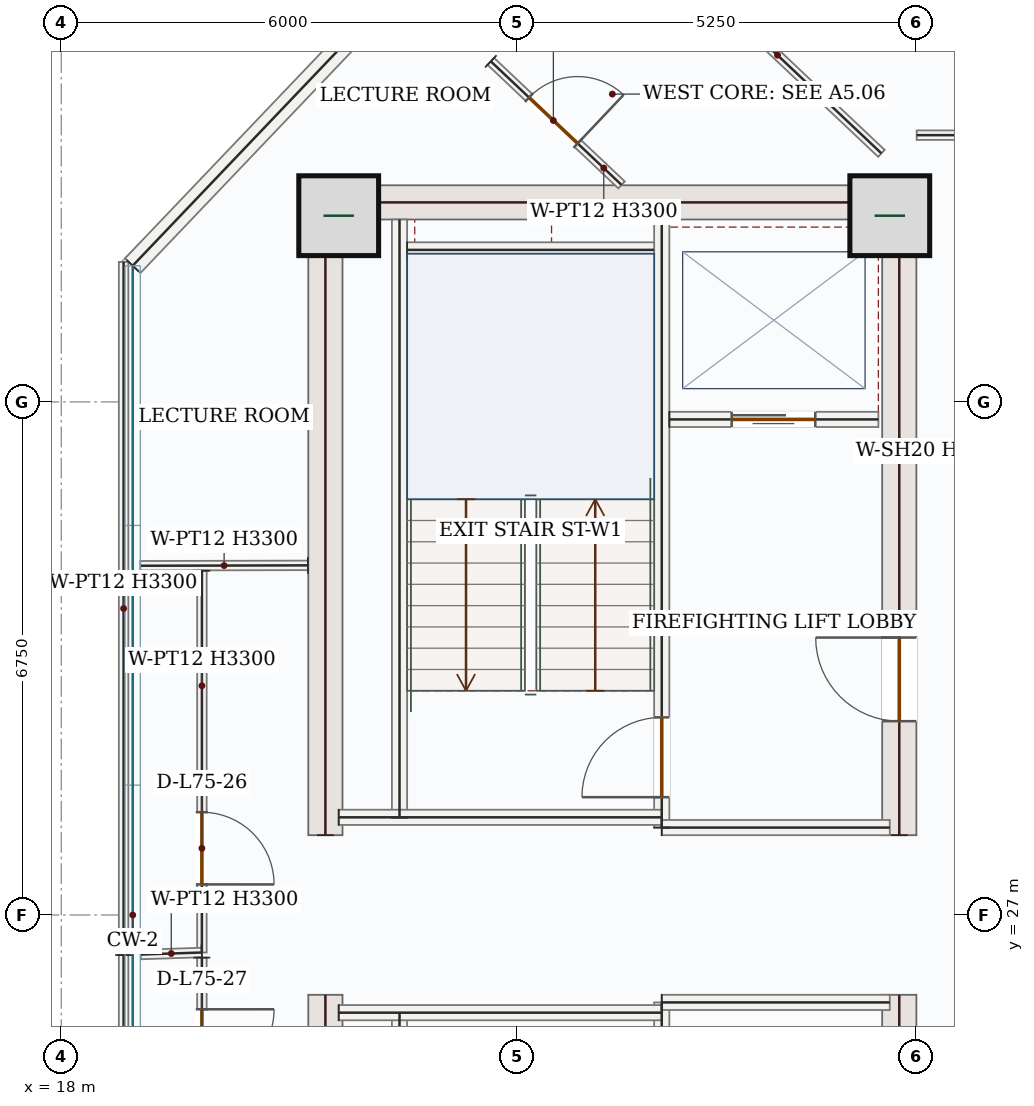
"""IFC4 building model, lengths in metres.
Left out: names, types, materials, properties, quantities, classifications, styles, units other than length and angle.
Written with IfcOpenShell. Run it as: python <this file> out.ifc"""

import sys

from ifc_helpers import new_model, si_unit, direction, frame, frame_2d, origin, origin_2d, place, context, subcontext, project, spatial, rectangle, extrude, source, transform, mapped, element, fill, save


model = new_model("IFC4")
c1 = context("Model", 3, precision=1e-05, world=origin(), true_north=direction((0.0, 1.0)))
c2 = subcontext(c1, "Body", "Model", "MODEL_VIEW")
j1 = project(units=[si_unit("LENGTHUNIT", "METRE"), si_unit("PLANEANGLEUNIT", "RADIAN")], contexts=[c1])
p1 = place(None, origin())
s1 = spatial("IfcSite", under=j1, at=p1, CompositionType="ELEMENT")
p2 = place(p1, origin())
s2 = spatial("IfcBuilding", under=s1, at=p2, CompositionType="ELEMENT")
p3 = place(p2, frame((0.0, 0.0, 310.35)))
s3 = spatial("IfcBuildingStorey", under=s2, at=p3, CompositionType="ELEMENT", Elevation=310.35)
m1 = source(origin(), c2, "Body", "SweptSolid", [
    extrude(rectangle(XDim=8.55, YDim=0.45, at=frame_2d((4.275, 0.0))), origin(), (0.0, 0.0, 1.0), 3.3),
])
for number, where, z_axis, x_axis in (
    (1, (21.475, 17.4, 0.0), (0.0, 0.0, 1.0), (0.0, 1.0, 0.0)),
    (2, (21.475, 28.05, 0.0), (0.0, 0.0, 1.0), (0.0, 1.0, 0.0)),
):
    element("IfcWall", number, at=place(p3, frame(where, z_axis=z_axis, x_axis=x_axis)), inside=s3, PredefinedType="SHEAR", context=c2, shape_type="MappedRepresentation", body=[
        mapped(m1, transform((0.0, 0.0, 0.0), x_axis=(1.0, 0.0, 0.0), y_axis=(0.0, 1.0, 0.0), z_axis=(0.0, 0.0, 1.0), scale=1.0)),
    ])
p4 = place(p3, frame((29.025, 17.4, 0.0), z_axis=(0.0, 0.0, 1.0), x_axis=(0.0, 1.0, 0.0)))
e3 = element("IfcWall", 3, at=p4, inside=s3, PredefinedType="SHEAR", context=c2, shape_type="SweptSolid", body=[
    extrude(rectangle(XDim=8.55, YDim=0.45, at=frame_2d((4.275, 0.0))), origin(), (0.0, 0.0, 1.0), 3.3),
])
p5 = place(p4, frame((6.65, 0.0, 0.0)))
e4 = element("IfcOpeningElement", 4, at=p5, cuts=e3, PredefinedType="OPENING", context=c2, shape_type="SweptSolid", body=[
    extrude(rectangle(XDim=1.1, YDim=2.2, at=frame_2d((0.55, 1.1))), frame((0.0, 0.235, 0.0), z_axis=(0.0, -1.0, 0.0), x_axis=(1.0, 0.0, 0.0)), (0.0, 0.0, 1.0), 0.47),
])
p6 = place(p4, frame((2.7, 0.0, 0.0)))
e5 = element("IfcOpeningElement", 5, at=p6, cuts=e3, PredefinedType="OPENING", context=c2, shape_type="SweptSolid", body=[
    extrude(rectangle(XDim=0.88, YDim=2.1, at=frame_2d((0.44, 1.05))), frame((0.0, 0.235, 0.0), z_axis=(0.0, -1.0, 0.0), x_axis=(1.0, 0.0, 0.0)), (0.0, 0.0, 1.0), 0.47),
])
p7 = place(p4, frame((4.6, 0.0, 0.0)))
e6 = element("IfcOpeningElement", 6, at=p7, cuts=e3, PredefinedType="OPENING", context=c2, shape_type="SweptSolid", body=[
    extrude(rectangle(XDim=0.88, YDim=2.1, at=frame_2d((0.44, 1.05))), frame((0.0, 0.235, 0.0), z_axis=(0.0, -1.0, 0.0), x_axis=(1.0, 0.0, 0.0)), (0.0, 0.0, 1.0), 0.47),
])
p8 = place(p3, frame((29.025, 28.05, 0.0), z_axis=(0.0, 0.0, 1.0), x_axis=(0.0, 1.0, 0.0)))
e7 = element("IfcWall", 7, at=p8, inside=s3, PredefinedType="SHEAR", context=c2, shape_type="SweptSolid", body=[
    extrude(rectangle(XDim=8.55, YDim=0.45, at=frame_2d((4.275, 0.0))), origin(), (0.0, 0.0, 1.0), 3.3),
])
p9 = place(p8, frame((1.5, 0.0, 0.0)))
e8 = element("IfcOpeningElement", 8, at=p9, cuts=e7, PredefinedType="OPENING", context=c2, shape_type="SweptSolid", body=[
    extrude(rectangle(XDim=1.1, YDim=2.2, at=frame_2d((0.55, 1.1))), frame((0.0, 0.235, 0.0), z_axis=(0.0, -1.0, 0.0), x_axis=(1.0, 0.0, 0.0)), (0.0, 0.0, 1.0), 0.47),
])
m2 = source(origin(), c2, "Body", "SweptSolid", [
    extrude(rectangle(XDim=7.1, YDim=0.45, at=frame_2d((3.55, 0.0))), origin(), (0.0, 0.0, 1.0), 3.3),
])
p10 = place(p3, frame((21.7, 36.375, 0.0), z_axis=(0.0, 0.0, 1.0), x_axis=(1.0, 0.0, 0.0)))
e9 = element("IfcWall", 9, at=p10, inside=s3, PredefinedType="SHEAR", context=c2, shape_type="MappedRepresentation", body=[
    mapped(m2, transform((0.0, 0.0, 0.0), x_axis=(1.0, 0.0, 0.0), y_axis=(0.0, 1.0, 0.0), z_axis=(0.0, 0.0, 1.0), scale=1.0)),
])
m3 = source(origin(), c2, "Body", "SweptSolid", [
    extrude(rectangle(XDim=1.05, YDim=1.05, at=origin_2d()), origin(), (0.0, 0.0, 1.0), 3.75),
])
for number, where, z_axis, x_axis in (
    (10, (21.65, 36.2, 0.0), (0.0, 0.0, 1.0), (1.0, 0.0, 0.0)),
    (11, (28.9, 36.2, 0.0), (0.0, 0.0, 1.0), (1.0, 0.0, 0.0)),
):
    element("IfcColumn", number, at=place(p3, frame(where, z_axis=z_axis, x_axis=x_axis)), inside=s3, PredefinedType="COLUMN", context=c2, shape_type="MappedRepresentation", body=[
        mapped(m3, transform((0.0, 0.0, 0.0), x_axis=(1.0, 0.0, 0.0), y_axis=(0.0, 1.0, 0.0), z_axis=(0.0, 0.0, 1.0), scale=1.0)),
    ])
m4 = source(origin(), c2, "Body", "SweptSolid", [
    extrude(rectangle(XDim=10.47, YDim=0.28, at=frame_2d((5.235, 0.0))), origin(), (0.0, 0.0, 1.0), 3.3),
])
p11 = place(p3, frame((18.94, 35.542, 0.0), z_axis=(0.0, 0.0, 1.0), x_axis=(0.690070788875, 0.723741878256, 0.0)))
e12 = element("IfcWall", 12, at=p11, inside=s3, PredefinedType="SOLIDWALL", context=c2, shape_type="MappedRepresentation", body=[
    mapped(m4, transform((0.0, 0.0, 0.0), x_axis=(1.0, 0.0, 0.0), y_axis=(0.0, 1.0, 0.0), z_axis=(0.0, 0.0, 1.0), scale=1.0)),
])
m5 = source(origin(), c2, "Body", "SweptSolid", [
    extrude(rectangle(XDim=7.87, YDim=0.2, at=frame_2d((3.935, 0.0))), origin(), (0.0, 0.0, 1.0), 3.3),
])
for number, where, z_axis, x_axis in (
    (13, (22.45, 17.85, 0.0), (0.0, 0.0, 1.0), (0.0, 1.0, 0.0)),
    (14, (22.45, 28.28, 0.0), (0.0, 0.0, 1.0), (0.0, 1.0, 0.0)),
):
    element("IfcWall", number, at=place(p3, frame(where, z_axis=z_axis, x_axis=x_axis)), inside=s3, PredefinedType="SOLIDWALL", context=c2, shape_type="MappedRepresentation", body=[
        mapped(m5, transform((0.0, 0.0, 0.0), x_axis=(1.0, 0.0, 0.0), y_axis=(0.0, 1.0, 0.0), z_axis=(0.0, 0.0, 1.0), scale=1.0)),
    ])
p12 = place(p3, frame((25.9, 17.85, 0.0), z_axis=(0.0, 0.0, 1.0), x_axis=(0.0, 1.0, 0.0)))
e15 = element("IfcWall", 15, at=p12, inside=s3, PredefinedType="SOLIDWALL", context=c2, shape_type="SweptSolid", body=[
    extrude(rectangle(XDim=8.0, YDim=0.2, at=frame_2d((4.0, 0.0))), origin(), (0.0, 0.0, 1.0), 3.3),
])
p13 = place(p12, frame((6.2, 0.0, 0.0)))
e16 = element("IfcOpeningElement", 16, at=p13, cuts=e15, PredefinedType="OPENING", context=c2, shape_type="SweptSolid", body=[
    extrude(rectangle(XDim=1.0, YDim=2.15, at=frame_2d((0.5, 1.075))), frame((0.0, 0.11, 0.0), z_axis=(0.0, -1.0, 0.0), x_axis=(1.0, 0.0, 0.0)), (0.0, 0.0, 1.0), 0.22),
])
p14 = place(p12, frame((0.6, 0.0, 0.0)))
e17 = element("IfcOpeningElement", 17, at=p14, cuts=e15, PredefinedType="OPENING", context=c2, shape_type="SweptSolid", body=[
    extrude(rectangle(XDim=0.88, YDim=2.1, at=frame_2d((0.44, 1.05))), frame((0.0, 0.11, 0.0), z_axis=(0.0, -1.0, 0.0), x_axis=(1.0, 0.0, 0.0)), (0.0, 0.0, 1.0), 0.22),
])
p15 = place(p3, frame((25.9, 28.15, 0.0), z_axis=(0.0, 0.0, 1.0), x_axis=(0.0, 1.0, 0.0)))
e18 = element("IfcWall", 18, at=p15, inside=s3, PredefinedType="SOLIDWALL", context=c2, shape_type="SweptSolid", body=[
    extrude(rectangle(XDim=8.0, YDim=0.2, at=frame_2d((4.0, 0.0))), origin(), (0.0, 0.0, 1.0), 3.3),
])
p16 = place(p15, frame((0.4, 0.0, 0.0)))
e19 = element("IfcOpeningElement", 19, at=p16, cuts=e18, PredefinedType="OPENING", context=c2, shape_type="SweptSolid", body=[
    extrude(rectangle(XDim=1.05, YDim=2.15, at=frame_2d((0.525, 1.075))), frame((0.0, 0.11, 0.0), z_axis=(0.0, -1.0, 0.0), x_axis=(1.0, 0.0, 0.0)), (0.0, 0.0, 1.0), 0.22),
])
m6 = source(origin(), c2, "Body", "SweptSolid", [
    extrude(rectangle(XDim=4.25, YDim=0.2, at=frame_2d((2.125, 0.0))), origin(), (0.0, 0.0, 1.0), 3.3),
])
p17 = place(p3, frame((21.65, 25.715, 0.0), z_axis=(0.0, 0.0, 1.0), x_axis=(1.0, 0.0, 0.0)))
e20 = element("IfcWall", 20, at=p17, inside=s3, PredefinedType="SOLIDWALL", context=c2, shape_type="MappedRepresentation", body=[
    mapped(m6, transform((0.0, 0.0, 0.0), x_axis=(1.0, 0.0, 0.0), y_axis=(0.0, 1.0, 0.0), z_axis=(0.0, 0.0, 1.0), scale=1.0)),
])
m7 = source(origin(), c2, "Body", "SweptSolid", [
    extrude(rectangle(XDim=3.0, YDim=0.2, at=frame_2d((1.5, 0.0))), origin(), (0.0, 0.0, 1.0), 3.3),
])
p18 = place(p3, frame((25.9, 25.85, 0.0), z_axis=(0.0, 0.0, 1.0), x_axis=(1.0, 0.0, 0.0)))
e21 = element("IfcWall", 21, at=p18, inside=s3, PredefinedType="SOLIDWALL", context=c2, shape_type="MappedRepresentation", body=[
    mapped(m7, transform((0.0, 0.0, 0.0), x_axis=(1.0, 0.0, 0.0), y_axis=(0.0, 1.0, 0.0), z_axis=(0.0, 0.0, 1.0), scale=1.0)),
])
p19 = place(p3, frame((21.65, 28.285, 0.0), z_axis=(0.0, 0.0, 1.0), x_axis=(1.0, 0.0, 0.0)))
e22 = element("IfcWall", 22, at=p19, inside=s3, PredefinedType="SOLIDWALL", context=c2, shape_type="MappedRepresentation", body=[
    mapped(m6, transform((0.0, 0.0, 0.0), x_axis=(1.0, 0.0, 0.0), y_axis=(0.0, 1.0, 0.0), z_axis=(0.0, 0.0, 1.0), scale=1.0)),
])
p20 = place(p3, frame((25.9, 28.15, 0.0), z_axis=(0.0, 0.0, 1.0), x_axis=(1.0, 0.0, 0.0)))
e23 = element("IfcWall", 23, at=p20, inside=s3, PredefinedType="SOLIDWALL", context=c2, shape_type="MappedRepresentation", body=[
    mapped(m7, transform((0.0, 0.0, 0.0), x_axis=(1.0, 0.0, 0.0), y_axis=(0.0, 1.0, 0.0), z_axis=(0.0, 0.0, 1.0), scale=1.0)),
])
m8 = source(origin(), c2, "Body", "SweptSolid", [
    extrude(rectangle(XDim=3.25, YDim=0.2, at=frame_2d((1.625, 0.0))), origin(), (0.0, 0.0, 1.0), 3.3),
])
p21 = place(p3, frame((22.55, 35.75, 0.0), z_axis=(0.0, 0.0, 1.0), x_axis=(1.0, 0.0, 0.0)))
e24 = element("IfcWall", 24, at=p21, inside=s3, PredefinedType="SOLIDWALL", context=c2, shape_type="MappedRepresentation", body=[
    mapped(m8, transform((0.0, 0.0, 0.0), x_axis=(1.0, 0.0, 0.0), y_axis=(0.0, 1.0, 0.0), z_axis=(0.0, 0.0, 1.0), scale=1.0)),
])
p22 = place(p3, frame((26.0, 33.52, 0.0), z_axis=(0.0, 0.0, 1.0), x_axis=(1.0, 0.0, 0.0)))
e25 = element("IfcWall", 25, at=p22, inside=s3, PredefinedType="SOLIDWALL", context=c2, shape_type="SweptSolid", body=[
    extrude(rectangle(XDim=2.75, YDim=0.2, at=frame_2d((1.375, 0.0))), origin(), (0.0, 0.0, 1.0), 3.3),
])
p23 = place(p22, frame((0.82, 0.0, 0.0)))
e26 = element("IfcOpeningElement", 26, at=p23, cuts=e25, PredefinedType="OPENING", context=c2, shape_type="SweptSolid", body=[
    extrude(rectangle(XDim=1.1, YDim=2.15, at=frame_2d((0.55, 1.075))), frame((0.0, 0.11, 0.0), z_axis=(0.0, -1.0, 0.0), x_axis=(1.0, 0.0, 0.0)), (0.0, 0.0, 1.0), 0.22),
])
p24 = place(p3, frame((23.651, 38.231, 0.0), z_axis=(0.0, 0.0, 1.0), x_axis=(0.726735597886, -0.686917295433, 0.0)))
e27 = element("IfcWall", 27, at=p24, inside=s3, PredefinedType="PARTITIONING", context=c2, shape_type="SweptSolid", body=[
    extrude(rectangle(XDim=2.367, YDim=0.125, at=frame_2d((1.183, 0.0))), origin(), (0.0, 0.0, 1.0), 3.3),
])
p25 = place(p24, frame((0.692, 0.0, 0.0)))
e28 = element("IfcOpeningElement", 28, at=p25, cuts=e27, PredefinedType="OPENING", context=c2, shape_type="SweptSolid", body=[
    extrude(rectangle(XDim=0.88, YDim=2.1, at=frame_2d((0.44, 1.05))), frame((0.0, 0.073, 0.0), z_axis=(0.0, -1.0, 0.0), x_axis=(1.0, 0.0, 0.0)), (0.0, 0.0, 1.0), 0.145),
])
p26 = place(p3, frame((24.456, 41.117, 0.0), z_axis=(0.0, 0.0, 1.0), x_axis=(0.726761082497, -0.686890332562, 0.0)))
e29 = element("IfcWall", 29, at=p26, inside=s3, PredefinedType="PARTITIONING", context=c2, shape_type="SweptSolid", body=[
    extrude(rectangle(XDim=5.964, YDim=0.125, at=frame_2d((2.982, 0.0))), origin(), (0.0, 0.0, 1.0), 3.3),
])
p27 = place(p26, frame((1.103, 0.0, 0.0)))
e30 = element("IfcOpeningElement", 30, at=p27, cuts=e29, PredefinedType="OPENING", context=c2, shape_type="SweptSolid", body=[
    extrude(rectangle(XDim=0.95, YDim=2.15, at=frame_2d((0.475, 1.075))), frame((0.0, 0.073, 0.0), z_axis=(0.0, -1.0, 0.0), x_axis=(1.0, 0.0, 0.0)), (0.0, 0.0, 1.0), 0.145),
])
m9 = source(origin(), c2, "Body", "SweptSolid", [
    extrude(rectangle(XDim=2.205, YDim=0.125, at=frame_2d((1.103, 0.0))), origin(), (0.0, 0.0, 1.0), 3.3),
])
p28 = place(p3, frame((21.245, 31.6, 0.0), z_axis=(0.0, 0.0, 1.0), x_axis=(-0.999997033492, -0.002435776654, 0.0)))
e31 = element("IfcWall", 31, at=p28, inside=s3, PredefinedType="PARTITIONING", context=c2, shape_type="MappedRepresentation", body=[
    mapped(m9, transform((0.0, 0.0, 0.0), x_axis=(1.0, 0.0, 0.0), y_axis=(0.0, 1.0, 0.0), z_axis=(0.0, 0.0, 1.0), scale=1.0)),
])
p29 = place(p3, frame((19.851, 31.529, 0.0), z_axis=(0.0, 0.0, 1.0), x_axis=(-9.7219521e-05, -0.999999995274, 0.0)))
e32 = element("IfcWall", 32, at=p29, inside=s3, PredefinedType="PARTITIONING", context=c2, shape_type="SweptSolid", body=[
    extrude(rectangle(XDim=5.022, YDim=0.125, at=frame_2d((2.511, 0.0))), origin(), (0.0, 0.0, 1.0), 3.3),
])
p30 = place(p29, frame((3.177, 0.0, 0.0)))
e33 = element("IfcOpeningElement", 33, at=p30, cuts=e32, PredefinedType="OPENING", context=c2, shape_type="SweptSolid", body=[
    extrude(rectangle(XDim=0.95, YDim=2.15, at=frame_2d((0.475, 1.075))), frame((0.0, 0.073, 0.0), z_axis=(0.0, -1.0, 0.0), x_axis=(1.0, 0.0, 0.0)), (0.0, 0.0, 1.0), 0.145),
])
m10 = source(origin(), c2, "Body", "SweptSolid", [
    extrude(rectangle(XDim=0.804, YDim=0.125, at=frame_2d((0.402, 0.0))), origin(), (0.0, 0.0, 1.0), 3.3),
])
p31 = place(p3, frame((19.849, 26.507, 0.0), z_axis=(0.0, 0.0, 1.0), x_axis=(-0.999452627665, -0.03308239794, 0.0)))
e34 = element("IfcWall", 34, at=p31, inside=s3, PredefinedType="PARTITIONING", context=c2, shape_type="MappedRepresentation", body=[
    mapped(m10, transform((0.0, 0.0, 0.0), x_axis=(1.0, 0.0, 0.0), y_axis=(0.0, 1.0, 0.0), z_axis=(0.0, 0.0, 1.0), scale=1.0)),
])
m11 = source(origin(), c2, "Body", "SweptSolid", [
    extrude(rectangle(XDim=9.119, YDim=0.125, at=frame_2d((4.56, 0.0))), origin(), (0.0, 0.0, 1.0), 3.3),
])
p32 = place(p3, frame((18.82, 26.473, 0.0), z_axis=(0.0, 0.0, 1.0), x_axis=(0.0, 1.0, 0.0)))
e35 = element("IfcWall", 35, at=p32, inside=s3, PredefinedType="PARTITIONING", context=c2, shape_type="MappedRepresentation", body=[
    mapped(m11, transform((0.0, 0.0, 0.0), x_axis=(1.0, 0.0, 0.0), y_axis=(0.0, 1.0, 0.0), z_axis=(0.0, 0.0, 1.0), scale=1.0)),
])
p33 = place(p3, frame((19.85, 26.439, 0.0), z_axis=(0.0, 0.0, 1.0), x_axis=(0.000241837961, -0.999999970757, 0.0)))
e36 = element("IfcWall", 36, at=p33, inside=s3, PredefinedType="PARTITIONING", context=c2, shape_type="SweptSolid", body=[
    extrude(rectangle(XDim=4.038, YDim=0.125, at=frame_2d((2.019, 0.0))), origin(), (0.0, 0.0, 1.0), 3.3),
])
p34 = place(p33, frame((0.679, 0.0, 0.0)))
e37 = element("IfcOpeningElement", 37, at=p34, cuts=e36, PredefinedType="OPENING", context=c2, shape_type="SweptSolid", body=[
    extrude(rectangle(XDim=0.95, YDim=2.15, at=frame_2d((0.475, 1.075))), frame((0.0, 0.073, 0.0), z_axis=(0.0, -1.0, 0.0), x_axis=(1.0, 0.0, 0.0)), (0.0, 0.0, 1.0), 0.145),
])
m12 = source(origin(), c2, "Body", "SweptSolid", [
    extrude(rectangle(XDim=8.064, YDim=0.125, at=frame_2d((4.032, 0.0))), origin(), (0.0, 0.0, 1.0), 3.3),
])
p35 = place(p3, frame((18.82, 18.408, 0.0), z_axis=(0.0, 0.0, 1.0), x_axis=(0.0, 1.0, 0.0)))
e38 = element("IfcWall", 38, at=p35, inside=s3, PredefinedType="PARTITIONING", context=c2, shape_type="MappedRepresentation", body=[
    mapped(m12, transform((0.0, 0.0, 0.0), x_axis=(1.0, 0.0, 0.0), y_axis=(0.0, 1.0, 0.0), z_axis=(0.0, 0.0, 1.0), scale=1.0)),
])
p36 = place(p3, frame((35.653, 37.26, 0.0), z_axis=(0.0, 0.0, 1.0), x_axis=(-0.999999997089, -7.6303842e-05, 0.0)))
e39 = element("IfcWall", 39, at=p36, inside=s3, PredefinedType="PARTITIONING", context=c2, shape_type="SweptSolid", body=[
    extrude(rectangle(XDim=6.399, YDim=0.125, at=frame_2d((3.2, 0.0))), origin(), (0.0, 0.0, 1.0), 3.3),
])
p37 = place(p36, frame((1.199, 0.0, 0.0)))
e40 = element("IfcOpeningElement", 40, at=p37, cuts=e39, PredefinedType="OPENING", context=c2, shape_type="SweptSolid", body=[
    extrude(rectangle(XDim=0.95, YDim=2.15, at=frame_2d((0.475, 1.075))), frame((0.0, 0.073, 0.0), z_axis=(0.0, -1.0, 0.0), x_axis=(1.0, 0.0, 0.0)), (0.0, 0.0, 1.0), 0.145),
])
m13 = source(origin(), c2, "Body", "SweptSolid", [
    extrude(rectangle(XDim=1.05, YDim=2.15, at=frame_2d((0.525, 1.075))), frame((0.0, 0.025, 0.0), z_axis=(0.0, -1.0, 0.0), x_axis=(1.0, 0.0, 0.0)), (0.0, 0.0, 1.0), 0.05),
])
p38 = place(p16, origin())
e41 = element("IfcDoor", 41, at=p38, inside=s3, OperationType="SINGLE_SWING_LEFT", PredefinedType="DOOR", context=c2, shape_type="MappedRepresentation", body=[
    mapped(m13, transform((0.0, 0.0, 0.0), x_axis=(1.0, 0.0, 0.0), y_axis=(0.0, 1.0, 0.0), z_axis=(0.0, 0.0, 1.0), scale=1.0)),
])
fill(e19, e41)
m14 = source(origin(), c2, "Body", "SweptSolid", [
    extrude(rectangle(XDim=1.1, YDim=2.15, at=frame_2d((0.55, 1.075))), frame((0.0, 0.025, 0.0), z_axis=(0.0, -1.0, 0.0), x_axis=(1.0, 0.0, 0.0)), (0.0, 0.0, 1.0), 0.05),
])
p39 = place(p23, origin())
e42 = element("IfcDoor", 42, at=p39, inside=s3, OperationType="DOUBLE_DOOR_SLIDING", PredefinedType="DOOR", context=c2, shape_type="MappedRepresentation", body=[
    mapped(m14, transform((0.0, 0.0, 0.0), x_axis=(1.0, 0.0, 0.0), y_axis=(0.0, 1.0, 0.0), z_axis=(0.0, 0.0, 1.0), scale=1.0)),
])
fill(e26, e42)
m15 = source(origin(), c2, "Body", "SweptSolid", [
    extrude(rectangle(XDim=1.1, YDim=2.2, at=frame_2d((0.55, 1.1))), frame((0.0, 0.025, 0.0), z_axis=(0.0, -1.0, 0.0), x_axis=(1.0, 0.0, 0.0)), (0.0, 0.0, 1.0), 0.05),
])
p40 = place(p9, origin())
e43 = element("IfcDoor", 43, at=p40, inside=s3, OperationType="SINGLE_SWING_RIGHT", PredefinedType="DOOR", context=c2, shape_type="MappedRepresentation", body=[
    mapped(m15, transform((0.0, 0.0, 0.0), x_axis=(1.0, 0.0, 0.0), y_axis=(0.0, 1.0, 0.0), z_axis=(0.0, 0.0, 1.0), scale=1.0)),
])
fill(e8, e43)
m16 = source(origin(), c2, "Body", "SweptSolid", [
    extrude(rectangle(XDim=0.95, YDim=2.15, at=frame_2d((0.475, 1.075))), frame((0.0, 0.025, 0.0), z_axis=(0.0, -1.0, 0.0), x_axis=(1.0, 0.0, 0.0)), (0.0, 0.0, 1.0), 0.05),
])
p41 = place(p30, origin())
e44 = element("IfcDoor", 44, at=p41, inside=s3, OperationType="SINGLE_SWING_RIGHT", PredefinedType="DOOR", context=c2, shape_type="MappedRepresentation", body=[
    mapped(m16, transform((0.0, 0.0, 0.0), x_axis=(1.0, 0.0, 0.0), y_axis=(0.0, 1.0, 0.0), z_axis=(0.0, 0.0, 1.0), scale=1.0)),
])
fill(e33, e44)
p42 = place(p34, origin())
e45 = element("IfcDoor", 45, at=p42, inside=s3, OperationType="SINGLE_SWING_LEFT", PredefinedType="DOOR", context=c2, shape_type="MappedRepresentation", body=[
    mapped(m16, transform((0.0, 0.0, 0.0), x_axis=(1.0, 0.0, 0.0), y_axis=(0.0, 1.0, 0.0), z_axis=(0.0, 0.0, 1.0), scale=1.0)),
])
fill(e37, e45)
m17 = source(origin(), c2, "Body", "SweptSolid", [
    extrude(rectangle(XDim=0.88, YDim=2.1, at=frame_2d((0.44, 1.05))), frame((0.0, 0.025, 0.0), z_axis=(0.0, -1.0, 0.0), x_axis=(1.0, 0.0, 0.0)), (0.0, 0.0, 1.0), 0.05),
])
p43 = place(p25, origin())
e46 = element("IfcDoor", 46, at=p43, inside=s3, OperationType="SINGLE_SWING_RIGHT", PredefinedType="DOOR", context=c2, shape_type="MappedRepresentation", body=[
    mapped(m17, transform((0.0, 0.0, 0.0), x_axis=(1.0, 0.0, 0.0), y_axis=(0.0, 1.0, 0.0), z_axis=(0.0, 0.0, 1.0), scale=1.0)),
])
fill(e28, e46)
save(model, sys.argv[1])
